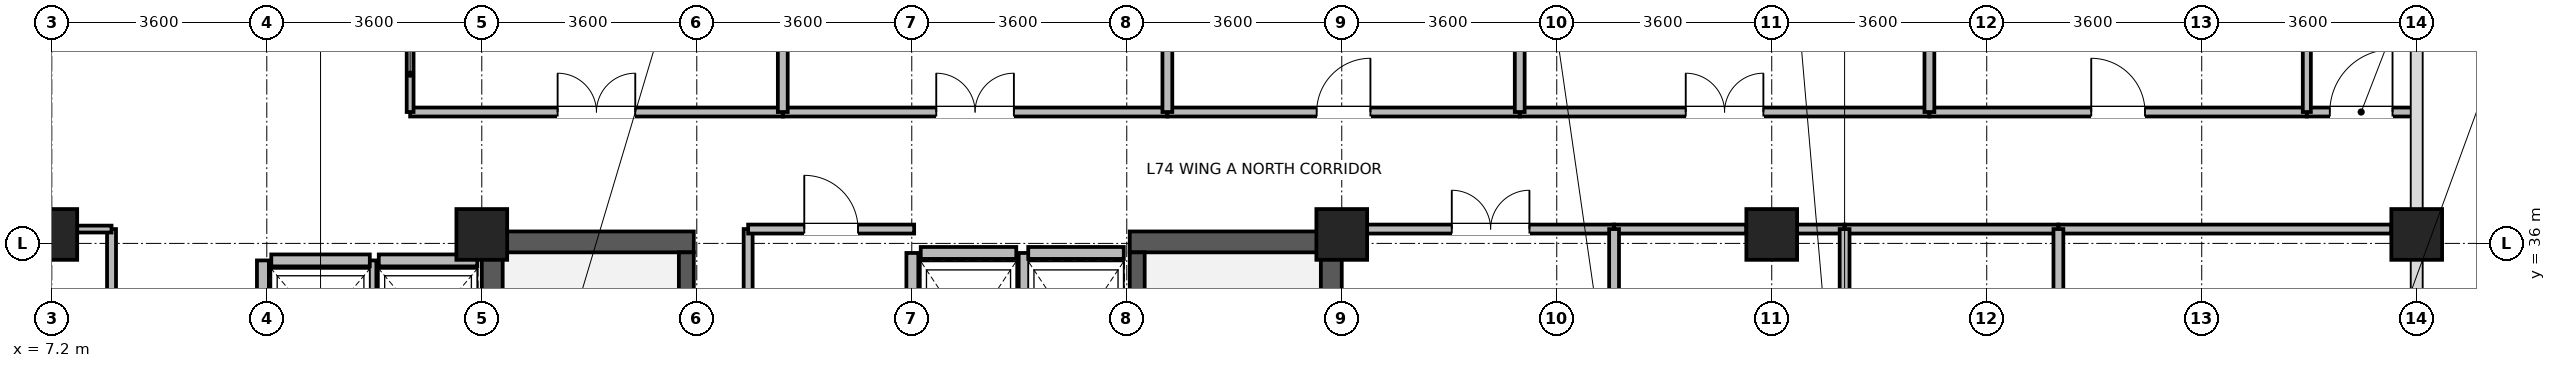
"""IFC4 building model, lengths in metres.
Left out: names, types, materials, properties, quantities, classifications, styles, units other than length and angle.
Written with IfcOpenShell. Run it as: python <this file> out.ifc"""

import sys

from ifc_helpers import new_model, si_unit, direction, frame, frame_2d, origin, origin_2d, place, context, subcontext, project, spatial, rectangle, extrude, source, transform, mapped, element, fill, save


model = new_model("IFC4")
c1 = context("Model", 3, precision=1e-05, world=origin(), true_north=direction((0.0, 1.0)))
c2 = subcontext(c1, "Body", "Model", "MODEL_VIEW")
j1 = project(units=[si_unit("LENGTHUNIT", "METRE"), si_unit("PLANEANGLEUNIT", "RADIAN")], contexts=[c1])
p1 = place(None, origin())
s1 = spatial("IfcSite", under=j1, at=p1, CompositionType="ELEMENT")
p2 = place(p1, origin())
s2 = spatial("IfcBuilding", under=s1, at=p2, CompositionType="ELEMENT")
p3 = place(p2, frame((0.0, 0.0, 286.9)))
s3 = spatial("IfcBuildingStorey", under=s2, at=p3, CompositionType="ELEMENT", Elevation=286.9)
for number, where, z_axis, x_axis in (
    (1, (14.575, 28.5, 0.0), (0.0, 0.0, 1.0), (0.0, 1.0, 0.0)),
    (2, (28.625, 28.5, 0.0), (0.0, 0.0, 1.0), (0.0, 1.0, 0.0)),
):
    element("IfcWall", number, at=place(p3, frame(where, z_axis=z_axis, x_axis=x_axis)), inside=s3, PredefinedType="SHEAR", context=c2, shape_type="SweptSolid", body=[
        extrude(rectangle(XDim=7.7, YDim=0.35, at=frame_2d((3.85, 0.0))), origin(), (0.0, 0.0, 1.0), 3.475),
    ])
for number, where, z_axis, x_axis in (
    (3, (14.75, 36.025, 0.0), (0.0, 0.0, 1.0), (1.0, 0.0, 0.0)),
    (4, (25.25, 36.025, 0.0), (0.0, 0.0, 1.0), (1.0, 0.0, 0.0)),
):
    element("IfcWall", number, at=place(p3, frame(where, z_axis=z_axis, x_axis=x_axis)), inside=s3, PredefinedType="SHEAR", context=c2, shape_type="SweptSolid", body=[
        extrude(rectangle(XDim=3.2, YDim=0.35, at=frame_2d((1.6, 0.0))), origin(), (0.0, 0.0, 1.0), 3.475),
    ])
p4 = place(p3, frame((17.825, 28.85, 0.0), z_axis=(0.0, 0.0, 1.0), x_axis=(0.0, 1.0, 0.0)))
e5 = element("IfcWall", 5, at=p4, inside=s3, PredefinedType="SHEAR", context=c2, shape_type="SweptSolid", body=[
    extrude(rectangle(XDim=7.0, YDim=0.25, at=frame_2d((3.5, 0.0))), origin(), (0.0, 0.0, 1.0), 3.475),
])
p5 = place(p4, frame((0.15, 0.0, 0.0)))
e6 = element("IfcOpeningElement", 6, at=p5, cuts=e5, PredefinedType="OPENING", context=c2, shape_type="SweptSolid", body=[
    extrude(rectangle(XDim=1.1, YDim=2.08, at=frame_2d((0.55, 1.04))), frame((0.0, 0.135, 0.0), z_axis=(0.0, -1.0, 0.0), x_axis=(1.0, 0.0, 0.0)), (0.0, 0.0, 1.0), 0.27),
])
p6 = place(p3, frame((25.375, 28.85, 0.0), z_axis=(0.0, 0.0, 1.0), x_axis=(0.0, 1.0, 0.0)))
e7 = element("IfcWall", 7, at=p6, inside=s3, PredefinedType="SHEAR", context=c2, shape_type="SweptSolid", body=[
    extrude(rectangle(XDim=7.0, YDim=0.25, at=frame_2d((3.5, 0.0))), origin(), (0.0, 0.0, 1.0), 3.475),
])
p7 = place(p6, frame((0.15, 0.0, 0.0)))
e8 = element("IfcOpeningElement", 8, at=p7, cuts=e7, PredefinedType="OPENING", context=c2, shape_type="SweptSolid", body=[
    extrude(rectangle(XDim=1.1, YDim=2.08, at=frame_2d((0.55, 1.04))), frame((0.0, 0.135, 0.0), z_axis=(0.0, -1.0, 0.0), x_axis=(1.0, 0.0, 0.0)), (0.0, 0.0, 1.0), 0.27),
])
m1 = source(origin(), c2, "Body", "SweptSolid", [
    extrude(rectangle(XDim=0.85, YDim=0.85, at=origin_2d()), origin(), (0.0, 0.0, 1.0), 3.7),
])
for number, where, z_axis, x_axis in (
    (9, (7.2, 36.15, 0.0), (0.0, 0.0, 1.0), (1.0, 0.0, 0.0)),
    (10, (14.4, 36.15, 0.0), (0.0, 0.0, 1.0), (1.0, 0.0, 0.0)),
    (11, (28.8, 36.15, 0.0), (0.0, 0.0, 1.0), (1.0, 0.0, 0.0)),
    (12, (36.0, 36.15, 0.0), (0.0, 0.0, 1.0), (1.0, 0.0, 0.0)),
    (13, (46.8, 36.15, 0.0), (0.0, 0.0, 1.0), (1.0, 0.0, 0.0)),
):
    element("IfcColumn", number, at=place(p3, frame(where, z_axis=z_axis, x_axis=x_axis)), inside=s3, PredefinedType="COLUMN", context=c2, shape_type="MappedRepresentation", body=[
        mapped(m1, transform((0.0, 0.0, 0.0), x_axis=(1.0, 0.0, 0.0), y_axis=(0.0, 1.0, 0.0), z_axis=(0.0, 0.0, 1.0), scale=1.0)),
    ])
p8 = place(p3, frame((12.675, 35.715, 0.0), z_axis=(0.0, 0.0, 1.0), x_axis=(1.0, 0.0, 0.0)))
e14 = element("IfcWall", 14, at=p8, inside=s3, PredefinedType="PARTITIONING", context=c2, shape_type="SweptSolid", body=[
    extrude(rectangle(XDim=1.65, YDim=0.2, at=frame_2d((0.825, 0.0))), origin(), (0.0, 0.0, 1.0), 3.455),
])
p9 = place(p3, frame((12.535, 33.485, 0.0), z_axis=(0.0, 0.0, 1.0), x_axis=(0.0, 1.0, 0.0)))
e15 = element("IfcWall", 15, at=p9, inside=s3, PredefinedType="PARTITIONING", context=c2, shape_type="SweptSolid", body=[
    extrude(rectangle(XDim=2.23, YDim=0.2, at=frame_2d((1.115, 0.0))), origin(), (0.0, 0.0, 1.0), 3.455),
])
p10 = place(p3, frame((10.875, 35.715, 0.0), z_axis=(0.0, 0.0, 1.0), x_axis=(1.0, 0.0, 0.0)))
e16 = element("IfcWall", 16, at=p10, inside=s3, PredefinedType="PARTITIONING", context=c2, shape_type="SweptSolid", body=[
    extrude(rectangle(XDim=1.65, YDim=0.2, at=frame_2d((0.825, 0.0))), origin(), (0.0, 0.0, 1.0), 3.455),
])
p11 = place(p3, frame((10.735, 33.485, 0.0), z_axis=(0.0, 0.0, 1.0), x_axis=(0.0, 1.0, 0.0)))
e17 = element("IfcWall", 17, at=p11, inside=s3, PredefinedType="PARTITIONING", context=c2, shape_type="SweptSolid", body=[
    extrude(rectangle(XDim=2.23, YDim=0.2, at=frame_2d((1.115, 0.0))), origin(), (0.0, 0.0, 1.0), 3.455),
])
p12 = place(p3, frame((21.75, 35.84, 0.0), z_axis=(0.0, 0.0, 1.0), x_axis=(1.0, 0.0, 0.0)))
e18 = element("IfcWall", 18, at=p12, inside=s3, PredefinedType="PARTITIONING", context=c2, shape_type="SweptSolid", body=[
    extrude(rectangle(XDim=1.6, YDim=0.2, at=frame_2d((0.8, 0.0))), origin(), (0.0, 0.0, 1.0), 2.555),
])
for number, where, z_axis, x_axis in (
    (19, (21.61, 33.16, 0.0), (0.0, 0.0, 1.0), (0.0, 1.0, 0.0)),
    (20, (23.49, 33.16, 0.0), (0.0, 0.0, 1.0), (0.0, 1.0, 0.0)),
):
    element("IfcWall", number, at=place(p3, frame(where, z_axis=z_axis, x_axis=x_axis)), inside=s3, PredefinedType="PARTITIONING", context=c2, shape_type="SweptSolid", body=[
        extrude(rectangle(XDim=2.68, YDim=0.2, at=frame_2d((1.34, 0.0))), origin(), (0.0, 0.0, 1.0), 3.455),
    ])
p13 = place(p3, frame((23.55, 35.84, 0.0), z_axis=(0.0, 0.0, 1.0), x_axis=(1.0, 0.0, 0.0)))
e21 = element("IfcWall", 21, at=p13, inside=s3, PredefinedType="PARTITIONING", context=c2, shape_type="SweptSolid", body=[
    extrude(rectangle(XDim=1.6, YDim=0.2, at=frame_2d((0.8, 0.0))), origin(), (0.0, 0.0, 1.0), 2.555),
])
p14 = place(p3, frame((31.78, 38.2, 0.0), z_axis=(0.0, 0.0, 1.0), x_axis=(1.0, 0.0, 0.0)))
e22 = element("IfcWall", 22, at=p14, inside=s3, PredefinedType="PARTITIONING", context=c2, shape_type="SweptSolid", body=[
    extrude(rectangle(XDim=6.86, YDim=0.15, at=frame_2d((3.43, 0.0))), origin(), (0.0, 0.0, 1.0), 3.455),
])
p15 = place(p14, frame((2.78, 0.0, 0.0)))
e23 = element("IfcOpeningElement", 23, at=p15, cuts=e22, PredefinedType="OPENING", context=c2, shape_type="SweptSolid", body=[
    extrude(rectangle(XDim=1.3, YDim=2.12, at=frame_2d((0.65, 1.06))), frame((0.0, 0.085, 0.0), z_axis=(0.0, -1.0, 0.0), x_axis=(1.0, 0.0, 0.0)), (0.0, 0.0, 1.0), 0.17),
])
p16 = place(p3, frame((19.44, 38.2, 0.0), z_axis=(0.0, 0.0, 1.0), x_axis=(1.0, 0.0, 0.0)))
e24 = element("IfcWall", 24, at=p16, inside=s3, PredefinedType="PARTITIONING", context=c2, shape_type="SweptSolid", body=[
    extrude(rectangle(XDim=6.44, YDim=0.15, at=frame_2d((3.22, 0.0))), origin(), (0.0, 0.0, 1.0), 3.455),
])
p17 = place(p16, frame((2.57, 0.0, 0.0)))
e25 = element("IfcOpeningElement", 25, at=p17, cuts=e24, PredefinedType="OPENING", context=c2, shape_type="SweptSolid", body=[
    extrude(rectangle(XDim=1.3, YDim=2.12, at=frame_2d((0.65, 1.06))), frame((0.0, 0.085, 0.0), z_axis=(0.0, -1.0, 0.0), x_axis=(1.0, 0.0, 0.0)), (0.0, 0.0, 1.0), 0.17),
])
p18 = place(p3, frame((38.64, 38.2, 0.0), z_axis=(0.0, 0.0, 1.0), x_axis=(1.0, 0.0, 0.0)))
e26 = element("IfcWall", 26, at=p18, inside=s3, PredefinedType="PARTITIONING", context=c2, shape_type="SweptSolid", body=[
    extrude(rectangle(XDim=6.32, YDim=0.15, at=frame_2d((3.16, 0.0))), origin(), (0.0, 0.0, 1.0), 3.455),
])
p19 = place(p18, frame((2.71, 0.0, 0.0)))
e27 = element("IfcOpeningElement", 27, at=p19, cuts=e26, PredefinedType="OPENING", context=c2, shape_type="SweptSolid", body=[
    extrude(rectangle(XDim=0.9, YDim=2.08, at=frame_2d((0.45, 1.04))), frame((0.0, 0.085, 0.0), z_axis=(0.0, -1.0, 0.0), x_axis=(1.0, 0.0, 0.0)), (0.0, 0.0, 1.0), 0.17),
])
p20 = place(p3, frame((13.2, 38.2, 0.0), z_axis=(0.0, 0.0, 1.0), x_axis=(1.0, 0.0, 0.0)))
e28 = element("IfcWall", 28, at=p20, inside=s3, PredefinedType="PARTITIONING", context=c2, shape_type="SweptSolid", body=[
    extrude(rectangle(XDim=6.24, YDim=0.15, at=frame_2d((3.12, 0.0))), origin(), (0.0, 0.0, 1.0), 3.455),
])
p21 = place(p20, frame((2.47, 0.0, 0.0)))
e29 = element("IfcOpeningElement", 29, at=p21, cuts=e28, PredefinedType="OPENING", context=c2, shape_type="SweptSolid", body=[
    extrude(rectangle(XDim=1.3, YDim=2.12, at=frame_2d((0.65, 1.06))), frame((0.0, 0.085, 0.0), z_axis=(0.0, -1.0, 0.0), x_axis=(1.0, 0.0, 0.0)), (0.0, 0.0, 1.0), 0.17),
])
p22 = place(p3, frame((40.8, 36.24, 0.0), z_axis=(0.0, 0.0, 1.0), x_axis=(1.0, 0.0, 0.0)))
e30 = element("IfcWall", 30, at=p22, inside=s3, PredefinedType="PARTITIONING", context=c2, shape_type="SweptSolid", body=[
    extrude(rectangle(XDim=5.575, YDim=0.15, at=frame_2d((2.788, 0.0))), origin(), (0.0, 0.0, 1.0), 2.905),
])
p23 = place(p3, frame((25.88, 38.2, 0.0), z_axis=(0.0, 0.0, 1.0), x_axis=(1.0, 0.0, 0.0)))
e31 = element("IfcWall", 31, at=p23, inside=s3, PredefinedType="PARTITIONING", context=c2, shape_type="SweptSolid", body=[
    extrude(rectangle(XDim=5.9, YDim=0.15, at=frame_2d((2.95, 0.0))), origin(), (0.0, 0.0, 1.0), 3.455),
])
p24 = place(p23, frame((2.5, 0.0, 0.0)))
e32 = element("IfcOpeningElement", 32, at=p24, cuts=e31, PredefinedType="OPENING", context=c2, shape_type="SweptSolid", body=[
    extrude(rectangle(XDim=0.9, YDim=2.08, at=frame_2d((0.45, 1.04))), frame((0.0, 0.085, 0.0), z_axis=(0.0, -1.0, 0.0), x_axis=(1.0, 0.0, 0.0)), (0.0, 0.0, 1.0), 0.17),
])
p25 = place(p3, frame((29.225, 36.24, 0.0), z_axis=(0.0, 0.0, 1.0), x_axis=(1.0, 0.0, 0.0)))
e33 = element("IfcWall", 33, at=p25, inside=s3, PredefinedType="PARTITIONING", context=c2, shape_type="SweptSolid", body=[
    extrude(rectangle(XDim=4.135, YDim=0.15, at=frame_2d((2.067, 0.0))), origin(), (0.0, 0.0, 1.0), 2.905),
])
p26 = place(p25, frame((1.417, 0.0, 0.0)))
e34 = element("IfcOpeningElement", 34, at=p26, cuts=e33, PredefinedType="OPENING", context=c2, shape_type="SweptSolid", body=[
    extrude(rectangle(XDim=1.3, YDim=2.12, at=frame_2d((0.65, 1.06))), frame((0.0, 0.085, 0.0), z_axis=(0.0, -1.0, 0.0), x_axis=(1.0, 0.0, 0.0)), (0.0, 0.0, 1.0), 0.17),
])
p27 = place(p3, frame((33.36, 36.24, 0.0), z_axis=(0.0, 0.0, 1.0), x_axis=(1.0, 0.0, 0.0)))
e35 = element("IfcWall", 35, at=p27, inside=s3, PredefinedType="PARTITIONING", context=c2, shape_type="SweptSolid", body=[
    extrude(rectangle(XDim=2.215, YDim=0.15, at=frame_2d((1.107, 0.0))), origin(), (0.0, 0.0, 1.0), 2.905),
])
p28 = place(p3, frame((36.425, 36.24, 0.0), z_axis=(0.0, 0.0, 1.0), x_axis=(1.0, 0.0, 0.0)))
e36 = element("IfcWall", 36, at=p28, inside=s3, PredefinedType="PARTITIONING", context=c2, shape_type="SweptSolid", body=[
    extrude(rectangle(XDim=0.795, YDim=0.15, at=frame_2d((0.397, 0.0))), origin(), (0.0, 0.0, 1.0), 2.905),
])
p29 = place(p3, frame((8.2, 32.4, 0.0), z_axis=(0.0, 0.0, 1.0), x_axis=(0.0, 1.0, 0.0)))
e37 = element("IfcWall", 37, at=p29, inside=s3, PredefinedType="PARTITIONING", context=c2, shape_type="SweptSolid", body=[
    extrude(rectangle(XDim=3.84, YDim=0.15, at=frame_2d((1.92, 0.0))), origin(), (0.0, 0.0, 1.0), 3.455),
])
p30 = place(p29, frame((1.27, 0.0, 0.0)))
e38 = element("IfcOpeningElement", 38, at=p30, cuts=e37, PredefinedType="OPENING", context=c2, shape_type="SweptSolid", body=[
    extrude(rectangle(XDim=1.3, YDim=2.12, at=frame_2d((0.65, 1.06))), frame((0.0, 0.085, 0.0), z_axis=(0.0, -1.0, 0.0), x_axis=(1.0, 0.0, 0.0)), (0.0, 0.0, 1.0), 0.17),
])
p31 = place(p3, frame((37.22, 36.24, 0.0), z_axis=(0.0, 0.0, 1.0), x_axis=(1.0, 0.0, 0.0)))
e39 = element("IfcWall", 39, at=p31, inside=s3, PredefinedType="PARTITIONING", context=c2, shape_type="SweptSolid", body=[
    extrude(rectangle(XDim=3.58, YDim=0.15, at=frame_2d((1.79, 0.0))), origin(), (0.0, 0.0, 1.0), 2.905),
])
p32 = place(p3, frame((18.86, 33.36, 0.0), z_axis=(0.0, 0.0, 1.0), x_axis=(0.0, 1.0, 0.0)))
e40 = element("IfcWall", 40, at=p32, inside=s3, PredefinedType="PARTITIONING", context=c2, shape_type="SweptSolid", body=[
    extrude(rectangle(XDim=2.88, YDim=0.15, at=frame_2d((1.44, 0.0))), origin(), (0.0, 0.0, 1.0), 3.455),
])
p33 = place(p3, frame((18.86, 36.24, 0.0), z_axis=(0.0, 0.0, 1.0), x_axis=(1.0, 0.0, 0.0)))
e41 = element("IfcWall", 41, at=p33, inside=s3, PredefinedType="PARTITIONING", context=c2, shape_type="SweptSolid", body=[
    extrude(rectangle(XDim=2.78, YDim=0.15, at=frame_2d((1.39, 0.0))), origin(), (0.0, 0.0, 1.0), 2.555),
])
p34 = place(p33, frame((0.94, 0.0, 0.0)))
e42 = element("IfcOpeningElement", 42, at=p34, cuts=e41, PredefinedType="OPENING", context=c2, shape_type="SweptSolid", body=[
    extrude(rectangle(XDim=0.9, YDim=2.08, at=frame_2d((0.45, 1.04))), frame((0.0, 0.085, 0.0), z_axis=(0.0, -1.0, 0.0), x_axis=(1.0, 0.0, 0.0)), (0.0, 0.0, 1.0), 0.17),
])
p35 = place(p3, frame((44.96, 38.2, 0.0), z_axis=(0.0, 0.0, 1.0), x_axis=(1.0, 0.0, 0.0)))
e43 = element("IfcWall", 43, at=p35, inside=s3, PredefinedType="PARTITIONING", context=c2, shape_type="SweptSolid", body=[
    extrude(rectangle(XDim=1.82, YDim=0.15, at=frame_2d((0.91, 0.0))), origin(), (0.0, 0.0, 1.0), 3.455),
])
p36 = place(p35, frame((0.385, 0.0, 0.0)))
e44 = element("IfcOpeningElement", 44, at=p36, cuts=e43, PredefinedType="OPENING", context=c2, shape_type="SweptSolid", body=[
    extrude(rectangle(XDim=1.05, YDim=2.12, at=frame_2d((0.525, 1.06))), frame((0.0, 0.085, 0.0), z_axis=(0.0, -1.0, 0.0), x_axis=(1.0, 0.0, 0.0)), (0.0, 0.0, 1.0), 0.17),
])
for number, where, z_axis, x_axis in (
    (45, (37.22, 28.56, 0.0), (0.0, 0.0, 1.0), (0.0, 1.0, 0.0)),
    (46, (40.8, 28.56, 0.0), (0.0, 0.0, 1.0), (0.0, 1.0, 0.0)),
):
    element("IfcWall", number, at=place(p3, frame(where, z_axis=z_axis, x_axis=x_axis)), inside=s3, PredefinedType="PARTITIONING", context=c2, shape_type="SweptSolid", body=[
        extrude(rectangle(XDim=7.68, YDim=0.165, at=frame_2d((3.84, 0.0))), origin(), (0.0, 0.0, 1.0), 3.455),
    ])
p37 = place(p3, frame((13.2, 38.2, 0.0), z_axis=(0.0, 0.0, 1.0), x_axis=(0.0, 1.0, 0.0)))
e47 = element("IfcWall", 47, at=p37, inside=s3, PredefinedType="PARTITIONING", context=c2, shape_type="SweptSolid", body=[
    extrude(rectangle(XDim=1.268, YDim=0.115, at=frame_2d((0.634, 0.0))), origin(), (0.0, 0.0, 1.0), 3.455),
])
for number, where, z_axis, x_axis in (
    (48, (19.44, 38.2, 0.0), (0.0, 0.0, 1.0), (0.0, 1.0, 0.0)),
    (49, (25.88, 38.2, 0.0), (0.0, 0.0, 1.0), (0.0, 1.0, 0.0)),
    (50, (31.78, 38.2, 0.0), (0.0, 0.0, 1.0), (0.0, 1.0, 0.0)),
    (51, (38.64, 38.2, 0.0), (0.0, 0.0, 1.0), (0.0, 1.0, 0.0)),
):
    element("IfcWall", number, at=place(p3, frame(where, z_axis=z_axis, x_axis=x_axis)), inside=s3, PredefinedType="PARTITIONING", context=c2, shape_type="SweptSolid", body=[
        extrude(rectangle(XDim=4.868, YDim=0.165, at=frame_2d((2.434, 0.0))), origin(), (0.0, 0.0, 1.0), 3.455),
    ])
p38 = place(p3, frame((44.96, 38.2, 0.0), z_axis=(0.0, 0.0, 1.0), x_axis=(0.0, 1.0, 0.0)))
e52 = element("IfcWall", 52, at=p38, inside=s3, PredefinedType="PARTITIONING", context=c2, shape_type="SweptSolid", body=[
    extrude(rectangle(XDim=4.868, YDim=0.135, at=frame_2d((2.434, 0.0))), origin(), (0.0, 0.0, 1.0), 3.455),
])
p39 = place(p3, frame((33.36, 31.64, 0.0), z_axis=(0.0, 0.0, 1.0), x_axis=(0.0, 1.0, 0.0)))
e53 = element("IfcWall", 53, at=p39, inside=s3, PredefinedType="PARTITIONING", context=c2, shape_type="SweptSolid", body=[
    extrude(rectangle(XDim=4.6, YDim=0.165, at=frame_2d((2.3, 0.0))), origin(), (0.0, 0.0, 1.0), 3.455),
])
p40 = place(p3, frame((7.625, 36.24, 0.0), z_axis=(0.0, 0.0, 1.0), x_axis=(1.0, 0.0, 0.0)))
e54 = element("IfcWall", 54, at=p40, inside=s3, PredefinedType="PARTITIONING", context=c2, shape_type="SweptSolid", body=[
    extrude(rectangle(XDim=0.575, YDim=0.115, at=frame_2d((0.288, 0.0))), origin(), (0.0, 0.0, 1.0), 2.905),
])
p41 = place(p15, origin())
e55 = element("IfcDoor", 55, at=p41, inside=s3, OperationType="DOUBLE_DOOR_SINGLE_SWING", PredefinedType="DOOR", context=c2, shape_type="SweptSolid", body=[
    extrude(rectangle(XDim=1.3, YDim=2.12, at=frame_2d((0.65, 1.06))), frame((0.0, 0.025, 0.0), z_axis=(0.0, -1.0, 0.0), x_axis=(1.0, 0.0, 0.0)), (0.0, 0.0, 1.0), 0.05),
])
fill(e23, e55)
p42 = place(p17, origin())
e56 = element("IfcDoor", 56, at=p42, inside=s3, OperationType="DOUBLE_DOOR_SINGLE_SWING", PredefinedType="DOOR", context=c2, shape_type="SweptSolid", body=[
    extrude(rectangle(XDim=1.3, YDim=2.12, at=frame_2d((0.65, 1.06))), frame((0.0, 0.025, 0.0), z_axis=(0.0, -1.0, 0.0), x_axis=(1.0, 0.0, 0.0)), (0.0, 0.0, 1.0), 0.05),
])
fill(e25, e56)
p43 = place(p19, origin())
e57 = element("IfcDoor", 57, at=p43, inside=s3, OperationType="SINGLE_SWING_LEFT", PredefinedType="DOOR", context=c2, shape_type="SweptSolid", body=[
    extrude(rectangle(XDim=0.9, YDim=2.08, at=frame_2d((0.45, 1.04))), frame((0.0, 0.025, 0.0), z_axis=(0.0, -1.0, 0.0), x_axis=(1.0, 0.0, 0.0)), (0.0, 0.0, 1.0), 0.05),
])
fill(e27, e57)
p44 = place(p21, origin())
e58 = element("IfcDoor", 58, at=p44, inside=s3, OperationType="DOUBLE_DOOR_SINGLE_SWING", PredefinedType="DOOR", context=c2, shape_type="SweptSolid", body=[
    extrude(rectangle(XDim=1.3, YDim=2.12, at=frame_2d((0.65, 1.06))), frame((0.0, 0.025, 0.0), z_axis=(0.0, -1.0, 0.0), x_axis=(1.0, 0.0, 0.0)), (0.0, 0.0, 1.0), 0.05),
])
fill(e29, e58)
p45 = place(p24, origin())
e59 = element("IfcDoor", 59, at=p45, inside=s3, OperationType="SINGLE_SWING_RIGHT", PredefinedType="DOOR", context=c2, shape_type="SweptSolid", body=[
    extrude(rectangle(XDim=0.9, YDim=2.08, at=frame_2d((0.45, 1.04))), frame((0.0, 0.025, 0.0), z_axis=(0.0, -1.0, 0.0), x_axis=(1.0, 0.0, 0.0)), (0.0, 0.0, 1.0), 0.05),
])
fill(e32, e59)
p46 = place(p26, origin())
e60 = element("IfcDoor", 60, at=p46, inside=s3, OperationType="DOUBLE_DOOR_SINGLE_SWING", PredefinedType="DOOR", context=c2, shape_type="SweptSolid", body=[
    extrude(rectangle(XDim=1.3, YDim=2.12, at=frame_2d((0.65, 1.06))), frame((0.0, 0.025, 0.0), z_axis=(0.0, -1.0, 0.0), x_axis=(1.0, 0.0, 0.0)), (0.0, 0.0, 1.0), 0.05),
])
fill(e34, e60)
p47 = place(p34, origin())
e61 = element("IfcDoor", 61, at=p47, inside=s3, OperationType="SINGLE_SWING_LEFT", PredefinedType="DOOR", context=c2, shape_type="SweptSolid", body=[
    extrude(rectangle(XDim=0.9, YDim=2.08, at=frame_2d((0.45, 1.04))), frame((0.0, 0.025, 0.0), z_axis=(0.0, -1.0, 0.0), x_axis=(1.0, 0.0, 0.0)), (0.0, 0.0, 1.0), 0.05),
])
fill(e42, e61)
p48 = place(p36, origin())
e62 = element("IfcDoor", 62, at=p48, inside=s3, OperationType="SINGLE_SWING_RIGHT", PredefinedType="DOOR", context=c2, shape_type="SweptSolid", body=[
    extrude(rectangle(XDim=1.05, YDim=2.12, at=frame_2d((0.525, 1.06))), frame((0.0, 0.025, 0.0), z_axis=(0.0, -1.0, 0.0), x_axis=(1.0, 0.0, 0.0)), (0.0, 0.0, 1.0), 0.05),
])
fill(e44, e62)
save(model, sys.argv[1])
